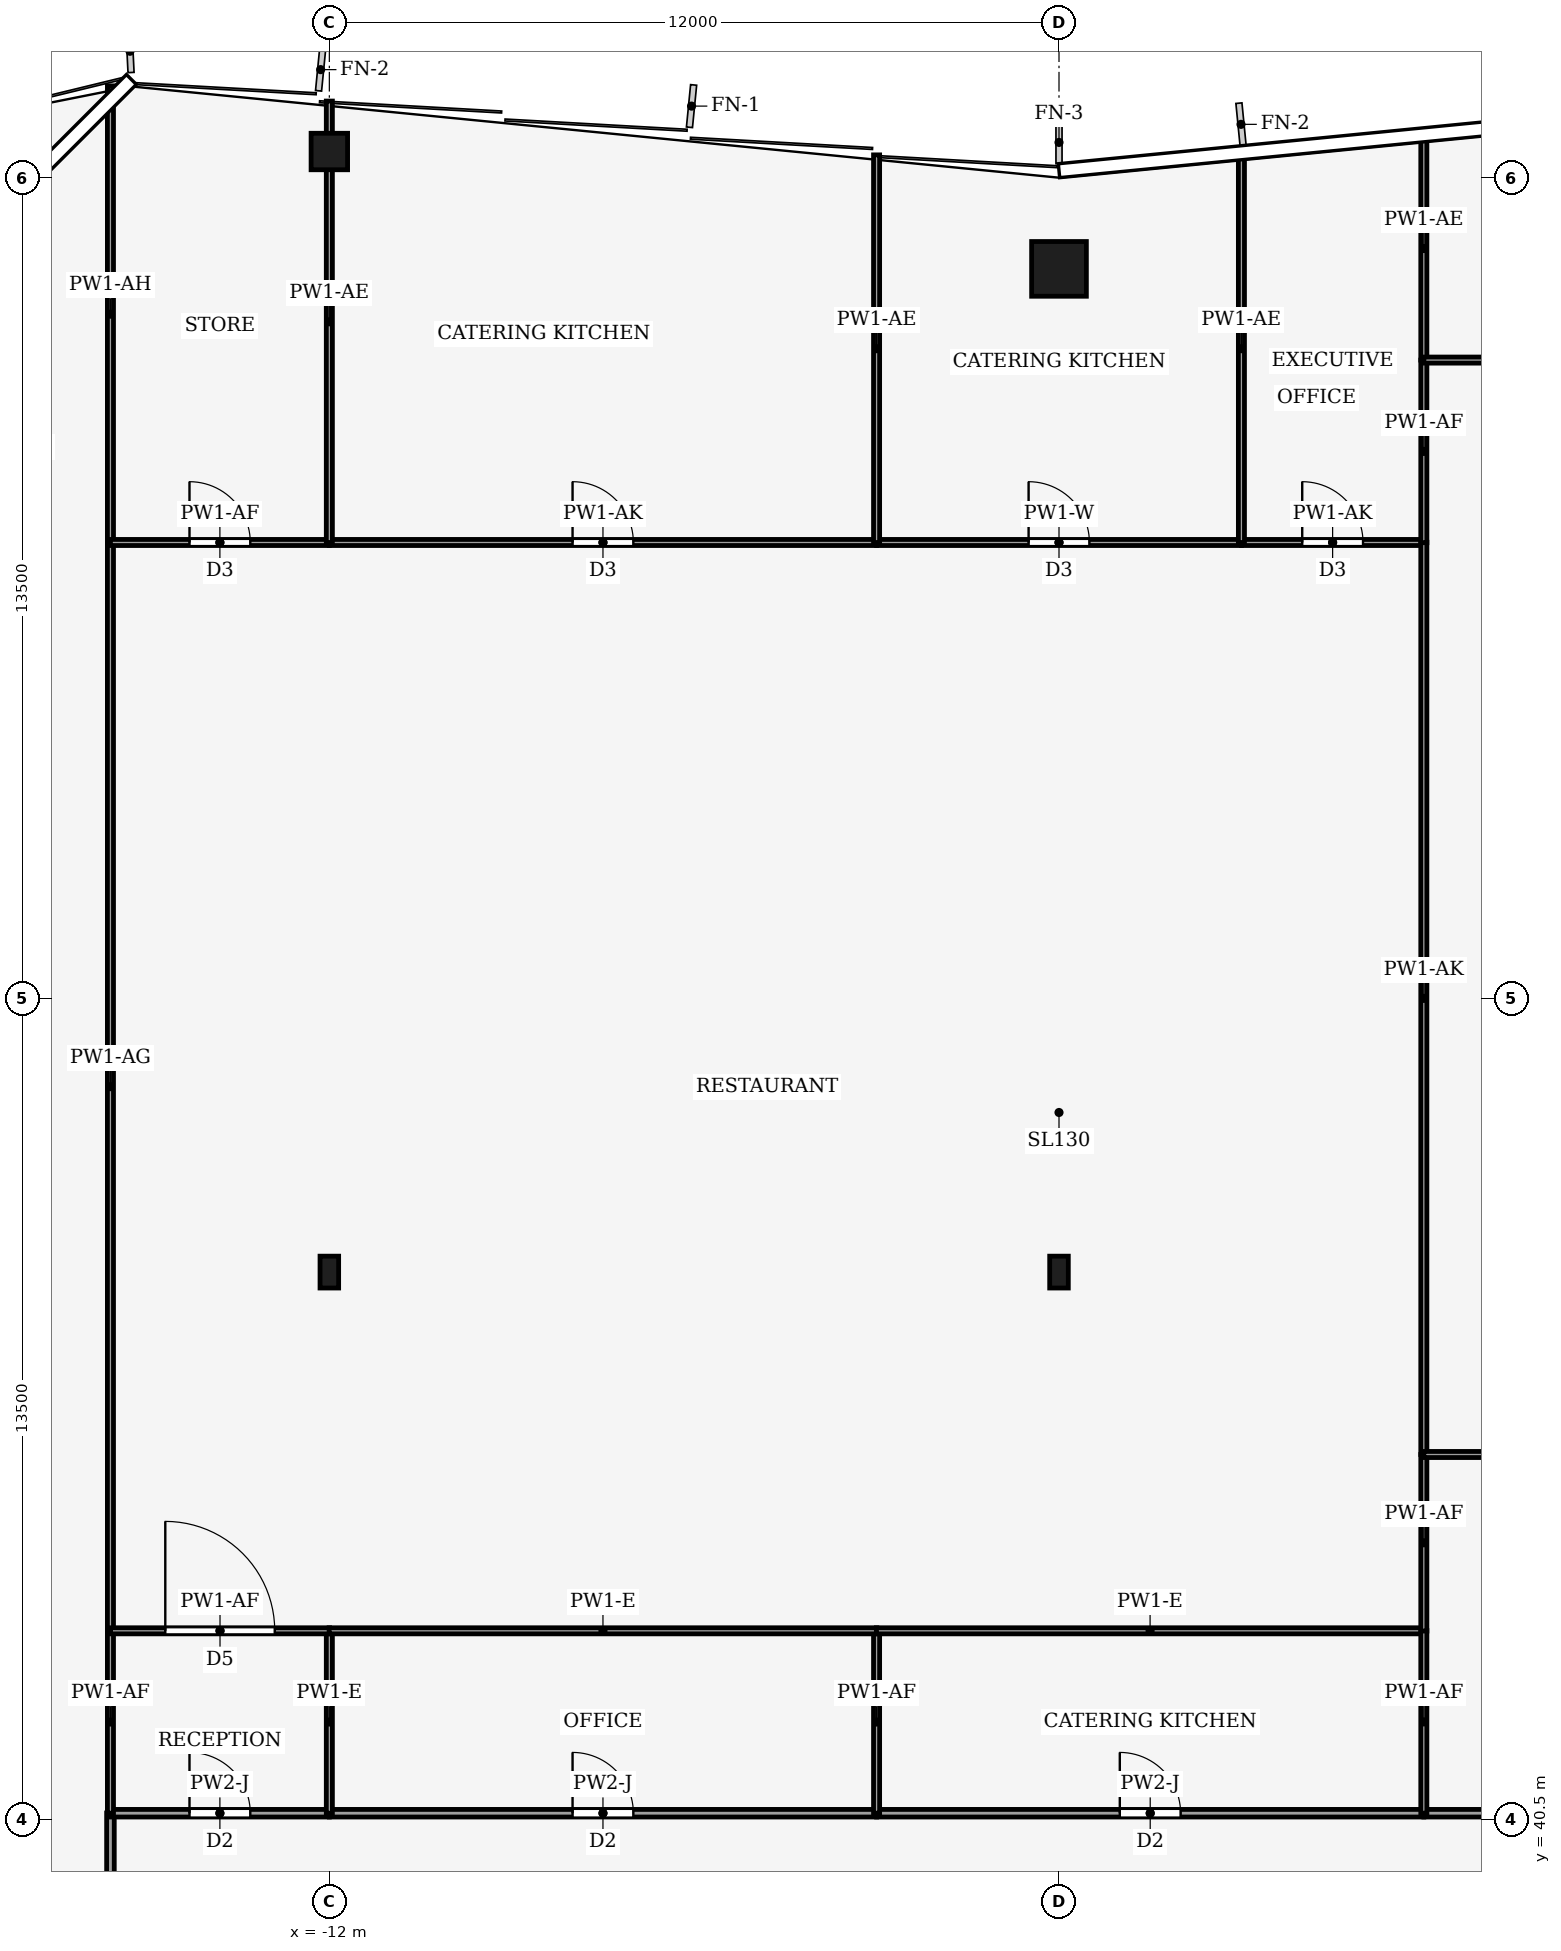
"""IFC4 building model, lengths in metres.
Left out: names, types, materials, properties, quantities, classifications, styles, units other than length and angle.
Written with IfcOpenShell. Run it as: python <this file> out.ifc"""

import sys

from ifc_helpers import new_model, si_unit, direction, frame, frame_2d, origin, origin_2d, place, context, subcontext, project, spatial, rectangle, hollow_rectangle, i_section, extrude, element, fill, save


model = new_model("IFC4")
c1 = context("Model", 3, precision=1e-05, world=origin(), true_north=direction((0.0, 1.0)))
c2 = subcontext(c1, "Body", "Model", "MODEL_VIEW")
j1 = project(units=[si_unit("LENGTHUNIT", "METRE"), si_unit("PLANEANGLEUNIT", "RADIAN")], contexts=[c1])
p1 = place(None, origin())
s1 = spatial("IfcSite", under=j1, at=p1, CompositionType="ELEMENT")
p2 = place(p1, origin())
s2 = spatial("IfcBuilding", under=s1, at=p2, CompositionType="ELEMENT")
p3 = place(p2, frame((0.0, 0.0, 330.0)))
s3 = spatial("IfcBuildingStorey", under=s2, at=p3, CompositionType="ELEMENT", Elevation=330.0)
p4 = place(p3, frame((0.0, 66.0, 0.0), z_axis=(0.0, 0.0, 1.0), x_axis=(1.0, 0.0, 0.0)))
e1 = element("IfcColumn", 1, at=p4, inside=s3, PredefinedType="COLUMN", context=c2, shape_type="SweptSolid", body=[
    extrude(hollow_rectangle(XDim=0.9, YDim=0.9, WallThickness=0.04, at=origin_2d()), origin(), (0.0, 0.0, 1.0), 4.0),
])
p5 = place(p3, frame((-12.0, 67.93, 0.0), z_axis=(0.0, 0.0, 1.0), x_axis=(1.0, 0.0, 0.0)))
e2 = element("IfcColumn", 2, at=p5, inside=s3, PredefinedType="COLUMN", context=c2, shape_type="SweptSolid", body=[
    extrude(hollow_rectangle(XDim=0.6, YDim=0.6, WallThickness=0.025, at=origin_2d()), origin(), (0.0, 0.0, 1.0), 4.0),
])
for number, where, z_axis, x_axis in (
    (3, (-12.0, 49.5, 0.0), (0.0, 0.0, 1.0), (1.0, 0.0, 0.0)),
    (4, (0.0, 49.5, 0.0), (0.0, 0.0, 1.0), (1.0, 0.0, 0.0)),
):
    element("IfcColumn", number, at=place(p3, frame(where, z_axis=z_axis, x_axis=x_axis)), inside=s3, PredefinedType="COLUMN", context=c2, shape_type="SweptSolid", body=[
        extrude(i_section(OverallWidth=0.306, OverallDepth=0.524, WebThickness=0.012, FlangeThickness=0.04, FilletRadius=0.027, at=origin_2d()), origin(), (0.0, 0.0, 1.0), 4.0),
    ])
p6 = place(p3, frame((-15.6, 34.5, 0.0), z_axis=(0.0, 0.0, 1.0), x_axis=(0.0, 1.0, 0.0)))
e5 = element("IfcWall", 5, at=p6, inside=s3, PredefinedType="PARTITIONING", context=c2, shape_type="SweptSolid", body=[
    extrude(rectangle(XDim=6.104, YDim=0.125, at=frame_2d((3.052, 0.0))), origin(), (0.0, 0.0, 1.0), 3.09),
])
p7 = place(p6, frame((2.552, 0.0, 0.0)))
e6 = element("IfcOpeningElement", 6, at=p7, cuts=e5, PredefinedType="OPENING", context=c2, shape_type="SweptSolid", body=[
    extrude(rectangle(XDim=1.0, YDim=2.1, at=frame_2d((0.5, 1.05))), frame((0.0, 0.073, 0.0), z_axis=(0.0, -1.0, 0.0), x_axis=(1.0, 0.0, 0.0)), (0.0, 0.0, 1.0), 0.145),
])
p8 = place(p3, frame((-15.6, 40.6, 0.0), z_axis=(0.0, 0.0, 1.0), x_axis=(1.0, 0.0, 0.0)))
e7 = element("IfcWall", 7, at=p8, inside=s3, PredefinedType="PARTITIONING", context=c2, shape_type="SweptSolid", body=[
    extrude(rectangle(XDim=3.6, YDim=0.125, at=frame_2d((1.8, 0.0))), origin(), (0.0, 0.0, 1.0), 3.34),
])
p9 = place(p8, frame((1.3, 0.0, 0.0)))
e8 = element("IfcOpeningElement", 8, at=p9, cuts=e7, PredefinedType="OPENING", context=c2, shape_type="SweptSolid", body=[
    extrude(rectangle(XDim=1.0, YDim=2.1, at=frame_2d((0.5, 1.05))), frame((0.0, 0.073, 0.0), z_axis=(0.0, -1.0, 0.0), x_axis=(1.0, 0.0, 0.0)), (0.0, 0.0, 1.0), 0.145),
])
p10 = place(p3, frame((-12.0, 40.6, 0.0), z_axis=(0.0, 0.0, 1.0), x_axis=(1.0, 0.0, 0.0)))
e9 = element("IfcWall", 9, at=p10, inside=s3, PredefinedType="PARTITIONING", context=c2, shape_type="SweptSolid", body=[
    extrude(rectangle(XDim=9.0, YDim=0.125, at=frame_2d((4.5, 0.0))), origin(), (0.0, 0.0, 1.0), 3.34),
])
p11 = place(p10, frame((4.0, 0.0, 0.0)))
e10 = element("IfcOpeningElement", 10, at=p11, cuts=e9, PredefinedType="OPENING", context=c2, shape_type="SweptSolid", body=[
    extrude(rectangle(XDim=1.0, YDim=2.1, at=frame_2d((0.5, 1.05))), frame((0.0, 0.073, 0.0), z_axis=(0.0, -1.0, 0.0), x_axis=(1.0, 0.0, 0.0)), (0.0, 0.0, 1.0), 0.145),
])
p12 = place(p3, frame((-3.0, 40.6, 0.0), z_axis=(0.0, 0.0, 1.0), x_axis=(1.0, 0.0, 0.0)))
e11 = element("IfcWall", 11, at=p12, inside=s3, PredefinedType="PARTITIONING", context=c2, shape_type="SweptSolid", body=[
    extrude(rectangle(XDim=9.0, YDim=0.125, at=frame_2d((4.5, 0.0))), origin(), (0.0, 0.0, 1.0), 3.34),
])
p13 = place(p12, frame((4.0, 0.0, 0.0)))
e12 = element("IfcOpeningElement", 12, at=p13, cuts=e11, PredefinedType="OPENING", context=c2, shape_type="SweptSolid", body=[
    extrude(rectangle(XDim=1.0, YDim=2.1, at=frame_2d((0.5, 1.05))), frame((0.0, 0.073, 0.0), z_axis=(0.0, -1.0, 0.0), x_axis=(1.0, 0.0, 0.0)), (0.0, 0.0, 1.0), 0.145),
])
p14 = place(p3, frame((6.0, 40.6, 0.0), z_axis=(0.0, 0.0, 1.0), x_axis=(1.0, 0.0, 0.0)))
e13 = element("IfcWall", 13, at=p14, inside=s3, PredefinedType="PARTITIONING", context=c2, shape_type="SweptSolid", body=[
    extrude(rectangle(XDim=6.0, YDim=0.125, at=frame_2d((3.0, 0.0))), origin(), (0.0, 0.0, 1.0), 3.34),
])
p15 = place(p14, frame((2.5, 0.0, 0.0)))
e14 = element("IfcOpeningElement", 14, at=p15, cuts=e13, PredefinedType="OPENING", context=c2, shape_type="SweptSolid", body=[
    extrude(rectangle(XDim=1.0, YDim=2.1, at=frame_2d((0.5, 1.05))), frame((0.0, 0.073, 0.0), z_axis=(0.0, -1.0, 0.0), x_axis=(1.0, 0.0, 0.0)), (0.0, 0.0, 1.0), 0.145),
])
p16 = place(p3, frame((-15.6, 40.6, 0.0), z_axis=(0.0, 0.0, 1.0), x_axis=(0.0, 1.0, 0.0)))
e15 = element("IfcWall", 15, at=p16, inside=s3, PredefinedType="PARTITIONING", context=c2, shape_type="SweptSolid", body=[
    extrude(rectangle(XDim=3.0, YDim=0.1, at=frame_2d((1.5, 0.0))), origin(), (0.0, 0.0, 1.0), 3.82),
])
p17 = place(p3, frame((-15.6, 43.6, 0.0), z_axis=(0.0, 0.0, 1.0), x_axis=(0.0, 1.0, 0.0)))
e16 = element("IfcWall", 16, at=p17, inside=s3, PredefinedType="PARTITIONING", context=c2, shape_type="SweptSolid", body=[
    extrude(rectangle(XDim=17.9, YDim=0.1, at=frame_2d((8.95, 0.0))), origin(), (0.0, 0.0, 1.0), 3.3),
])
p18 = place(p3, frame((-15.6, 61.5, 0.0), z_axis=(0.0, 0.0, 1.0), x_axis=(0.0, 1.0, 0.0)))
e17 = element("IfcWall", 17, at=p18, inside=s3, PredefinedType="PARTITIONING", context=c2, shape_type="SweptSolid", body=[
    extrude(rectangle(XDim=7.51, YDim=0.1, at=frame_2d((3.755, 0.0))), origin(), (0.0, 0.0, 1.0), 2.88),
])
p19 = place(p3, frame((-12.0, 40.6, 0.0), z_axis=(0.0, 0.0, 1.0), x_axis=(0.0, 1.0, 0.0)))
e18 = element("IfcWall", 18, at=p19, inside=s3, PredefinedType="PARTITIONING", context=c2, shape_type="SweptSolid", body=[
    extrude(rectangle(XDim=3.0, YDim=0.1, at=frame_2d((1.5, 0.0))), origin(), (0.0, 0.0, 1.0), 3.34),
])
p20 = place(p3, frame((-15.6, 43.6, 0.0), z_axis=(0.0, 0.0, 1.0), x_axis=(1.0, 0.0, 0.0)))
e19 = element("IfcWall", 19, at=p20, inside=s3, PredefinedType="PARTITIONING", context=c2, shape_type="SweptSolid", body=[
    extrude(rectangle(XDim=3.604, YDim=0.1, at=frame_2d((1.802, 0.0))), origin(), (0.0, 0.0, 1.0), 3.82),
])
p21 = place(p20, frame((0.902, 0.0, 0.0)))
e20 = element("IfcOpeningElement", 20, at=p21, cuts=e19, PredefinedType="OPENING", context=c2, shape_type="SweptSolid", body=[
    extrude(rectangle(XDim=1.8, YDim=2.1, at=frame_2d((0.9, 1.05))), frame((0.0, 0.06, 0.0), z_axis=(0.0, -1.0, 0.0), x_axis=(1.0, 0.0, 0.0)), (0.0, 0.0, 1.0), 0.12),
])
p22 = place(p3, frame((-3.0, 40.6, 0.0), z_axis=(0.0, 0.0, 1.0), x_axis=(0.0, 1.0, 0.0)))
e21 = element("IfcWall", 21, at=p22, inside=s3, PredefinedType="PARTITIONING", context=c2, shape_type="SweptSolid", body=[
    extrude(rectangle(XDim=3.0, YDim=0.1, at=frame_2d((1.5, 0.0))), origin(), (0.0, 0.0, 1.0), 3.82),
])
p23 = place(p3, frame((-2.996, 43.6, 0.0), z_axis=(0.0, 0.0, 1.0), x_axis=(-1.0, 0.0, 0.0)))
e22 = element("IfcWall", 22, at=p23, inside=s3, PredefinedType="PARTITIONING", context=c2, shape_type="SweptSolid", body=[
    extrude(rectangle(XDim=9.008, YDim=0.1, at=frame_2d((4.504, 0.0))), origin(), (0.0, 0.0, 1.0), 3.34),
])
p24 = place(p3, frame((6.0, 43.6, 0.0), z_axis=(0.0, 0.0, 1.0), x_axis=(-1.0, 0.0, 0.0)))
e23 = element("IfcWall", 23, at=p24, inside=s3, PredefinedType="PARTITIONING", context=c2, shape_type="SweptSolid", body=[
    extrude(rectangle(XDim=9.004, YDim=0.1, at=frame_2d((4.502, 0.0))), origin(), (0.0, 0.0, 1.0), 3.34),
])
p25 = place(p3, frame((6.0, 40.6, 0.0), z_axis=(0.0, 0.0, 1.0), x_axis=(0.0, 1.0, 0.0)))
e24 = element("IfcWall", 24, at=p25, inside=s3, PredefinedType="PARTITIONING", context=c2, shape_type="SweptSolid", body=[
    extrude(rectangle(XDim=3.004, YDim=0.1, at=frame_2d((1.502, 0.0))), origin(), (0.0, 0.0, 1.0), 3.82),
])
p26 = place(p3, frame((-15.6, 61.5, 0.0), z_axis=(0.0, 0.0, 1.0), x_axis=(1.0, 0.0, 0.0)))
e25 = element("IfcWall", 25, at=p26, inside=s3, PredefinedType="PARTITIONING", context=c2, shape_type="SweptSolid", body=[
    extrude(rectangle(XDim=3.6, YDim=0.1, at=frame_2d((1.8, 0.0))), origin(), (0.0, 0.0, 1.0), 3.82),
])
p27 = place(p26, frame((1.3, 0.0, 0.0)))
e26 = element("IfcOpeningElement", 26, at=p27, cuts=e25, PredefinedType="OPENING", context=c2, shape_type="SweptSolid", body=[
    extrude(rectangle(XDim=1.0, YDim=2.1, at=frame_2d((0.5, 1.05))), frame((0.0, 0.06, 0.0), z_axis=(0.0, -1.0, 0.0), x_axis=(1.0, 0.0, 0.0)), (0.0, 0.0, 1.0), 0.12),
])
p28 = place(p3, frame((-12.0, 61.5, 0.0), z_axis=(0.0, 0.0, 1.0), x_axis=(1.0, 0.0, 0.0)))
e27 = element("IfcWall", 27, at=p28, inside=s3, PredefinedType="PARTITIONING", context=c2, shape_type="SweptSolid", body=[
    extrude(rectangle(XDim=9.0, YDim=0.1, at=frame_2d((4.5, 0.0))), origin(), (0.0, 0.0, 1.0), 3.19),
])
p29 = place(p28, frame((4.0, 0.0, 0.0)))
e28 = element("IfcOpeningElement", 28, at=p29, cuts=e27, PredefinedType="OPENING", context=c2, shape_type="SweptSolid", body=[
    extrude(rectangle(XDim=1.0, YDim=2.1, at=frame_2d((0.5, 1.05))), frame((0.0, 0.06, 0.0), z_axis=(0.0, -1.0, 0.0), x_axis=(1.0, 0.0, 0.0)), (0.0, 0.0, 1.0), 0.12),
])
p30 = place(p3, frame((-3.0, 61.5, 0.0), z_axis=(0.0, 0.0, 1.0), x_axis=(1.0, 0.0, 0.0)))
e29 = element("IfcWall", 29, at=p30, inside=s3, PredefinedType="PARTITIONING", context=c2, shape_type="SweptSolid", body=[
    extrude(rectangle(XDim=6.0, YDim=0.1, at=frame_2d((3.0, 0.0))), origin(), (0.0, 0.0, 1.0), 3.24),
])
p31 = place(p30, frame((2.5, 0.0, 0.0)))
e30 = element("IfcOpeningElement", 30, at=p31, cuts=e29, PredefinedType="OPENING", context=c2, shape_type="SweptSolid", body=[
    extrude(rectangle(XDim=1.0, YDim=2.1, at=frame_2d((0.5, 1.05))), frame((0.0, 0.06, 0.0), z_axis=(0.0, -1.0, 0.0), x_axis=(1.0, 0.0, 0.0)), (0.0, 0.0, 1.0), 0.12),
])
p32 = place(p3, frame((3.0, 61.5, 0.0), z_axis=(0.0, 0.0, 1.0), x_axis=(1.0, 0.0, 0.0)))
e31 = element("IfcWall", 31, at=p32, inside=s3, PredefinedType="PARTITIONING", context=c2, shape_type="SweptSolid", body=[
    extrude(rectangle(XDim=3.0, YDim=0.1, at=frame_2d((1.5, 0.0))), origin(), (0.0, 0.0, 1.0), 3.19),
])
p33 = place(p32, frame((1.0, 0.0, 0.0)))
e32 = element("IfcOpeningElement", 32, at=p33, cuts=e31, PredefinedType="OPENING", context=c2, shape_type="SweptSolid", body=[
    extrude(rectangle(XDim=1.0, YDim=2.1, at=frame_2d((0.5, 1.05))), frame((0.0, 0.06, 0.0), z_axis=(0.0, -1.0, 0.0), x_axis=(1.0, 0.0, 0.0)), (0.0, 0.0, 1.0), 0.12),
])
p34 = place(p3, frame((6.0, 43.596, 0.0), z_axis=(0.0, 0.0, 1.0), x_axis=(0.0, 1.0, 0.0)))
e33 = element("IfcWall", 33, at=p34, inside=s3, PredefinedType="PARTITIONING", context=c2, shape_type="SweptSolid", body=[
    extrude(rectangle(XDim=2.904, YDim=0.1, at=frame_2d((1.452, 0.0))), origin(), (0.0, 0.0, 1.0), 3.82),
])
p35 = place(p3, frame((6.0, 46.5, 0.0), z_axis=(0.0, 0.0, 1.0), x_axis=(0.0, 1.0, 0.0)))
e34 = element("IfcWall", 34, at=p35, inside=s3, PredefinedType="PARTITIONING", context=c2, shape_type="SweptSolid", body=[
    extrude(rectangle(XDim=15.004, YDim=0.1, at=frame_2d((7.502, 0.0))), origin(), (0.0, 0.0, 1.0), 3.19),
])
p36 = place(p3, frame((-12.0, 61.5, 0.0), z_axis=(0.0, 0.0, 1.0), x_axis=(0.0, 1.0, 0.0)))
e35 = element("IfcWall", 35, at=p36, inside=s3, PredefinedType="PARTITIONING", context=c2, shape_type="SweptSolid", body=[
    extrude(rectangle(XDim=7.26, YDim=0.1, at=frame_2d((3.63, 0.0))), origin(), (0.0, 0.0, 1.0), 2.99),
])
for number, where, z_axis, x_axis in (
    (36, (-3.0, 61.5, 0.0), (0.0, 0.0, 1.0), (0.0, 1.0, 0.0)),
    (37, (3.0, 61.5, 0.0), (0.0, 0.0, 1.0), (0.0, 1.0, 0.0)),
):
    element("IfcWall", number, at=place(p3, frame(where, z_axis=z_axis, x_axis=x_axis)), inside=s3, PredefinedType="PARTITIONING", context=c2, shape_type="SweptSolid", body=[
        extrude(rectangle(XDim=6.375, YDim=0.1, at=frame_2d((3.188, 0.0))), origin(), (0.0, 0.0, 1.0), 2.99),
    ])
p37 = place(p3, frame((6.0, 61.496, 0.0), z_axis=(0.0, 0.0, 1.0), x_axis=(0.0, 1.0, 0.0)))
e38 = element("IfcWall", 38, at=p37, inside=s3, PredefinedType="PARTITIONING", context=c2, shape_type="SweptSolid", body=[
    extrude(rectangle(XDim=3.004, YDim=0.1, at=frame_2d((1.502, 0.0))), origin(), (0.0, 0.0, 1.0), 3.82),
])
p38 = place(p3, frame((6.0, 64.5, 0.0), z_axis=(0.0, 0.0, 1.0), x_axis=(0.0, 1.0, 0.0)))
e39 = element("IfcWall", 39, at=p38, inside=s3, PredefinedType="PARTITIONING", context=c2, shape_type="SweptSolid", body=[
    extrude(rectangle(XDim=3.67, YDim=0.1, at=frame_2d((1.835, 0.0))), origin(), (0.0, 0.0, 1.0), 2.99),
])
p39 = place(p3, frame((6.0, 46.5, 0.0), z_axis=(0.0, 0.0, 1.0), x_axis=(1.0, 0.0, 0.0)))
e40 = element("IfcWall", 40, at=p39, inside=s3, PredefinedType="PARTITIONING", context=c2, shape_type="SweptSolid", body=[
    extrude(rectangle(XDim=6.004, YDim=0.1, at=frame_2d((3.002, 0.0))), origin(), (0.0, 0.0, 1.0), 3.34),
])
p40 = place(p39, frame((2.102, 0.0, 0.0)))
e41 = element("IfcOpeningElement", 41, at=p40, cuts=e40, PredefinedType="OPENING", context=c2, shape_type="SweptSolid", body=[
    extrude(rectangle(XDim=1.8, YDim=2.1, at=frame_2d((0.9, 1.05))), frame((0.0, 0.06, 0.0), z_axis=(0.0, -1.0, 0.0), x_axis=(1.0, 0.0, 0.0)), (0.0, 0.0, 1.0), 0.12),
])
p41 = place(p3, frame((6.0, 64.5, 0.0), z_axis=(0.0, 0.0, 1.0), x_axis=(1.0, 0.0, 0.0)))
e42 = element("IfcWall", 42, at=p41, inside=s3, PredefinedType="PARTITIONING", context=c2, shape_type="SweptSolid", body=[
    extrude(rectangle(XDim=9.6, YDim=0.1, at=frame_2d((4.8, 0.0))), origin(), (0.0, 0.0, 1.0), 3.19),
])
p42 = place(p41, frame((3.1, 0.0, 0.0)))
e43 = element("IfcOpeningElement", 43, at=p42, cuts=e42, PredefinedType="OPENING", context=c2, shape_type="SweptSolid", body=[
    extrude(rectangle(XDim=1.0, YDim=2.1, at=frame_2d((0.5, 1.05))), frame((0.0, 0.06, 0.0), z_axis=(0.0, -1.0, 0.0), x_axis=(1.0, 0.0, 0.0)), (0.0, 0.0, 1.0), 0.12),
])
p43 = place(p9, origin())
e44 = element("IfcDoor", 44, at=p43, inside=s3, OperationType="SINGLE_SWING_LEFT", PredefinedType="DOOR", context=c2, shape_type="SweptSolid", body=[
    extrude(rectangle(XDim=1.0, YDim=2.1, at=frame_2d((0.5, 1.05))), frame((0.0, 0.025, 0.0), z_axis=(0.0, -1.0, 0.0), x_axis=(1.0, 0.0, 0.0)), (0.0, 0.0, 1.0), 0.05),
])
fill(e8, e44)
p44 = place(p11, origin())
e45 = element("IfcDoor", 45, at=p44, inside=s3, OperationType="SINGLE_SWING_RIGHT", PredefinedType="DOOR", context=c2, shape_type="SweptSolid", body=[
    extrude(rectangle(XDim=1.0, YDim=2.1, at=frame_2d((0.5, 1.05))), frame((0.0, 0.025, 0.0), z_axis=(0.0, -1.0, 0.0), x_axis=(1.0, 0.0, 0.0)), (0.0, 0.0, 1.0), 0.05),
])
fill(e10, e45)
p45 = place(p13, origin())
e46 = element("IfcDoor", 46, at=p45, inside=s3, OperationType="SINGLE_SWING_LEFT", PredefinedType="DOOR", context=c2, shape_type="SweptSolid", body=[
    extrude(rectangle(XDim=1.0, YDim=2.1, at=frame_2d((0.5, 1.05))), frame((0.0, 0.025, 0.0), z_axis=(0.0, -1.0, 0.0), x_axis=(1.0, 0.0, 0.0)), (0.0, 0.0, 1.0), 0.05),
])
fill(e12, e46)
p46 = place(p21, origin())
e47 = element("IfcDoor", 47, at=p46, inside=s3, OperationType="DOUBLE_DOOR_SINGLE_SWING", PredefinedType="DOOR", context=c2, shape_type="SweptSolid", body=[
    extrude(rectangle(XDim=1.8, YDim=2.1, at=frame_2d((0.9, 1.05))), frame((0.0, 0.025, 0.0), z_axis=(0.0, -1.0, 0.0), x_axis=(1.0, 0.0, 0.0)), (0.0, 0.0, 1.0), 0.05),
])
fill(e20, e47)
p47 = place(p27, origin())
e48 = element("IfcDoor", 48, at=p47, inside=s3, OperationType="SINGLE_SWING_LEFT", PredefinedType="DOOR", context=c2, shape_type="SweptSolid", body=[
    extrude(rectangle(XDim=1.0, YDim=2.1, at=frame_2d((0.5, 1.05))), frame((0.0, 0.025, 0.0), z_axis=(0.0, -1.0, 0.0), x_axis=(1.0, 0.0, 0.0)), (0.0, 0.0, 1.0), 0.05),
])
fill(e26, e48)
p48 = place(p29, origin())
e49 = element("IfcDoor", 49, at=p48, inside=s3, OperationType="SINGLE_SWING_RIGHT", PredefinedType="DOOR", context=c2, shape_type="SweptSolid", body=[
    extrude(rectangle(XDim=1.0, YDim=2.1, at=frame_2d((0.5, 1.05))), frame((0.0, 0.025, 0.0), z_axis=(0.0, -1.0, 0.0), x_axis=(1.0, 0.0, 0.0)), (0.0, 0.0, 1.0), 0.05),
])
fill(e28, e49)
p49 = place(p31, origin())
e50 = element("IfcDoor", 50, at=p49, inside=s3, OperationType="SINGLE_SWING_LEFT", PredefinedType="DOOR", context=c2, shape_type="SweptSolid", body=[
    extrude(rectangle(XDim=1.0, YDim=2.1, at=frame_2d((0.5, 1.05))), frame((0.0, 0.025, 0.0), z_axis=(0.0, -1.0, 0.0), x_axis=(1.0, 0.0, 0.0)), (0.0, 0.0, 1.0), 0.05),
])
fill(e30, e50)
p50 = place(p33, origin())
e51 = element("IfcDoor", 51, at=p50, inside=s3, OperationType="SINGLE_SWING_RIGHT", PredefinedType="DOOR", context=c2, shape_type="SweptSolid", body=[
    extrude(rectangle(XDim=1.0, YDim=2.1, at=frame_2d((0.5, 1.05))), frame((0.0, 0.025, 0.0), z_axis=(0.0, -1.0, 0.0), x_axis=(1.0, 0.0, 0.0)), (0.0, 0.0, 1.0), 0.05),
])
fill(e32, e51)
save(model, sys.argv[1])
